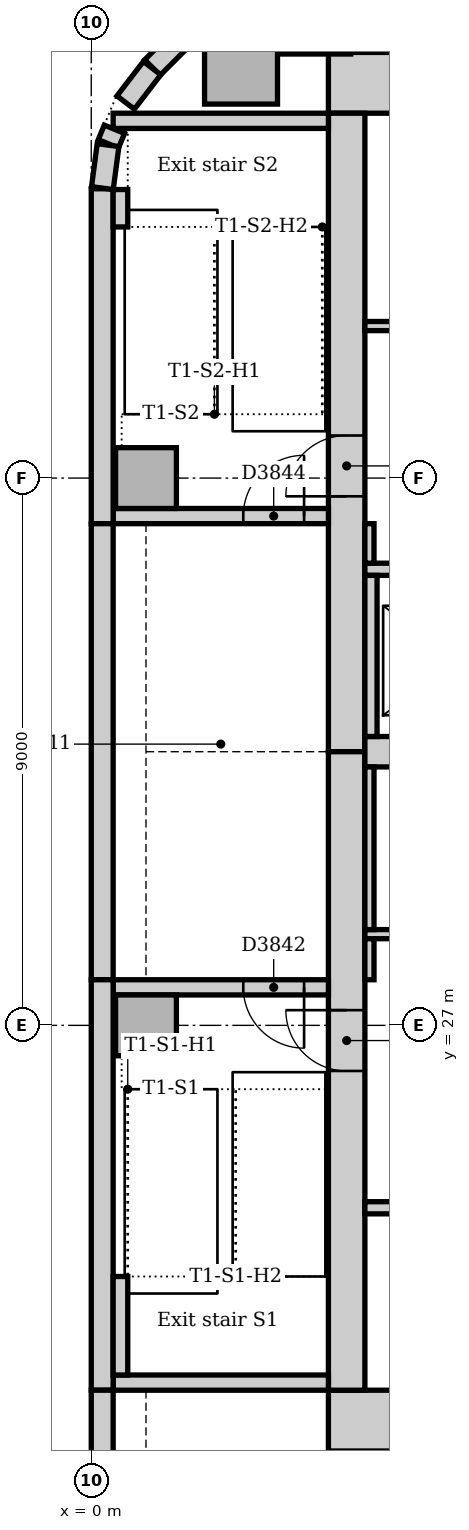
"""IFC4 building model, lengths in metres.
Left out: names, types, materials, properties, quantities, classifications, styles, units other than length and angle.
Written with IfcOpenShell. Run it as: python <this file> out.ifc"""

import sys

from ifc_helpers import new_model, si_unit, direction, frame, frame_2d, origin, origin_2d, place, context, subcontext, project, spatial, rectangle, extrude, element, fill, save


model = new_model("IFC4")
c1 = context("Model", 3, precision=1e-05, world=origin(), true_north=direction((0.0, 1.0)))
c2 = subcontext(c1, "Body", "Model", "MODEL_VIEW")
j1 = project(units=[si_unit("LENGTHUNIT", "METRE"), si_unit("PLANEANGLEUNIT", "RADIAN")], contexts=[c1])
p1 = place(None, origin())
s1 = spatial("IfcSite", under=j1, at=p1, CompositionType="ELEMENT")
p2 = place(p1, origin())
s2 = spatial("IfcBuilding", under=s1, at=p2, CompositionType="ELEMENT")
p3 = place(p2, frame((0.0, 0.0, 91.0)))
s3 = spatial("IfcBuildingStorey", under=s2, at=p3, CompositionType="ELEMENT", Elevation=91.0)
for number, where, z_axis, x_axis in (
    (1, (3.9, 20.5, 0.0), (0.0, 0.0, 1.0), (1.0, 0.0, 0.0)),
    (2, (23.5, 42.5, 0.0), (0.0, 0.0, 1.0), (-1.0, 0.0, 0.0)),
):
    element("IfcWall", number, at=place(p3, frame(where, z_axis=z_axis, x_axis=x_axis)), inside=s3, PredefinedType="SOLIDWALL", context=c2, shape_type="SweptSolid", body=[
        extrude(rectangle(XDim=19.6, YDim=1.0, at=frame_2d((9.8, 0.0))), origin(), (0.0, 0.0, 1.0), 4.0),
    ])
p4 = place(p3, frame((4.2, 42.0, 0.0), z_axis=(0.0, 0.0, 1.0), x_axis=(0.0, -1.0, 0.0)))
e3 = element("IfcWall", 3, at=p4, inside=s3, PredefinedType="SOLIDWALL", context=c2, shape_type="SweptSolid", body=[
    extrude(rectangle(XDim=10.5, YDim=0.6, at=frame_2d((5.25, 0.0))), origin(), (0.0, 0.0, 1.0), 4.0),
])
p5 = place(p4, frame((5.3, 0.0, 0.0)))
e4 = element("IfcOpeningElement", 4, at=p5, cuts=e3, PredefinedType="OPENING", context=c2, shape_type="SweptSolid", body=[
    extrude(rectangle(XDim=1.0, YDim=2.1, at=frame_2d((0.5, 1.05))), frame((0.0, 0.31, 0.0), z_axis=(0.0, -1.0, 0.0), x_axis=(1.0, 0.0, 0.0)), (0.0, 0.0, 1.0), 0.62),
])
p6 = place(p3, frame((4.2, 31.5, 0.0), z_axis=(0.0, 0.0, 1.0), x_axis=(0.0, -1.0, 0.0)))
e5 = element("IfcWall", 5, at=p6, inside=s3, PredefinedType="SOLIDWALL", context=c2, shape_type="SweptSolid", body=[
    extrude(rectangle(XDim=10.5, YDim=0.6, at=frame_2d((5.25, 0.0))), origin(), (0.0, 0.0, 1.0), 4.0),
])
p7 = place(p6, frame((4.25, 0.0, 0.0)))
e6 = element("IfcOpeningElement", 6, at=p7, cuts=e5, PredefinedType="OPENING", context=c2, shape_type="SweptSolid", body=[
    extrude(rectangle(XDim=1.0, YDim=2.1, at=frame_2d((0.5, 1.05))), frame((0.0, 0.31, 0.0), z_axis=(0.0, -1.0, 0.0), x_axis=(1.0, 0.0, 0.0)), (0.0, 0.0, 1.0), 0.62),
])
p8 = place(p3, frame((4.5, 31.5, 0.0), z_axis=(0.0, 0.0, 1.0), x_axis=(1.0, 0.0, 0.0)))
e7 = element("IfcWall", 7, at=p8, inside=s3, PredefinedType="SOLIDWALL", context=c2, shape_type="SweptSolid", body=[
    extrude(rectangle(XDim=18.0, YDim=0.5, at=frame_2d((9.0, 0.0))), origin(), (0.0, 0.0, 1.0), 4.0),
])
p9 = place(p3, frame((0.36, 21.125, 0.0), z_axis=(0.0, 0.0, 1.0), x_axis=(1.0, 0.0, 0.0)))
e8 = element("IfcWall", 8, at=p9, inside=s3, PredefinedType="SOLIDWALL", context=c2, shape_type="SweptSolid", body=[
    extrude(rectangle(XDim=3.54, YDim=0.25, at=frame_2d((1.77, 0.0))), origin(), (0.0, 0.0, 1.0), 4.0),
])
p10 = place(p3, frame((3.9, 27.625, 0.0), z_axis=(0.0, 0.0, 1.0), x_axis=(-1.0, 0.0, 0.0)))
e9 = element("IfcWall", 9, at=p10, inside=s3, PredefinedType="SOLIDWALL", context=c2, shape_type="SweptSolid", body=[
    extrude(rectangle(XDim=3.54, YDim=0.25, at=frame_2d((1.77, 0.0))), origin(), (0.0, 0.0, 1.0), 4.0),
])
p11 = place(p10, frame((0.4, 0.0, 0.0)))
e10 = element("IfcOpeningElement", 10, at=p11, cuts=e9, PredefinedType="OPENING", context=c2, shape_type="SweptSolid", body=[
    extrude(rectangle(XDim=1.0, YDim=2.1, at=frame_2d((0.5, 1.05))), frame((0.0, 0.135, 0.0), z_axis=(0.0, -1.0, 0.0), x_axis=(1.0, 0.0, 0.0)), (0.0, 0.0, 1.0), 0.27),
])
p12 = place(p3, frame((0.36, 35.375, 0.0), z_axis=(0.0, 0.0, 1.0), x_axis=(1.0, 0.0, 0.0)))
e11 = element("IfcWall", 11, at=p12, inside=s3, PredefinedType="SOLIDWALL", context=c2, shape_type="SweptSolid", body=[
    extrude(rectangle(XDim=3.54, YDim=0.25, at=frame_2d((1.77, 0.0))), origin(), (0.0, 0.0, 1.0), 4.0),
])
p13 = place(p12, frame((2.14, 0.0, 0.0)))
e12 = element("IfcOpeningElement", 12, at=p13, cuts=e11, PredefinedType="OPENING", context=c2, shape_type="SweptSolid", body=[
    extrude(rectangle(XDim=1.0, YDim=2.1, at=frame_2d((0.5, 1.05))), frame((0.0, 0.135, 0.0), z_axis=(0.0, -1.0, 0.0), x_axis=(1.0, 0.0, 0.0)), (0.0, 0.0, 1.0), 0.27),
])
p14 = place(p3, frame((3.9, 41.875, 0.0), z_axis=(0.0, 0.0, 1.0), x_axis=(-1.0, 0.0, 0.0)))
e13 = element("IfcWall", 13, at=p14, inside=s3, PredefinedType="SOLIDWALL", context=c2, shape_type="SweptSolid", body=[
    extrude(rectangle(XDim=3.54, YDim=0.25, at=frame_2d((1.77, 0.0))), origin(), (0.0, 0.0, 1.0), 4.0),
])
for number, where, z_axis, x_axis in (
    (14, (3.667, 43.574, 0.0), (0.0, 0.0, 1.0), (1.0, 0.0, 0.0)),
    (15, (2.463, 42.75, 0.0), (0.0, 0.0, 1.0), (1.0, 0.0, 0.0)),
):
    element("IfcColumn", number, at=place(p3, frame(where, z_axis=z_axis, x_axis=x_axis)), inside=s3, PredefinedType="COLUMN", context=c2, shape_type="SweptSolid", body=[
        extrude(rectangle(XDim=1.2, YDim=1.2, at=origin_2d()), origin(), (0.0, 0.0, 1.0), 3.7),
    ])
for number, where, z_axis, x_axis in (
    (16, (0.9, 27.0, 0.0), (0.0, 0.0, 1.0), (1.0, 0.0, 0.0)),
    (17, (0.9, 36.0, 0.0), (0.0, 0.0, 1.0), (1.0, 0.0, 0.0)),
):
    element("IfcColumn", number, at=place(p3, frame(where, z_axis=z_axis, x_axis=x_axis)), inside=s3, PredefinedType="COLUMN", context=c2, shape_type="SweptSolid", body=[
        extrude(rectangle(XDim=1.0, YDim=1.0, at=origin_2d()), origin(), (0.0, 0.0, 1.0), 4.0),
    ])
p15 = place(p3, frame((2.249, 43.994, 0.0), z_axis=(0.0, 0.0, 1.0), x_axis=(-0.707106781187, -0.707106781187, 0.0)))
e18 = element("IfcWall", 18, at=p15, inside=s3, PredefinedType="STANDARD", context=c2, shape_type="SweptSolid", body=[
    extrude(rectangle(XDim=1.757, YDim=0.36, at=frame_2d((0.879, 0.0))), origin(), (0.0, 0.0, 1.0), 3.7),
])
p16 = place(p3, frame((0.18, 40.757, 0.0), z_axis=(0.0, 0.0, 1.0), x_axis=(0.0, -1.0, 0.0)))
e19 = element("IfcWall", 19, at=p16, inside=s3, PredefinedType="STANDARD", context=c2, shape_type="SweptSolid", body=[
    extrude(rectangle(XDim=5.507, YDim=0.36, at=frame_2d((2.754, 0.0))), origin(), (0.0, 0.0, 1.0), 3.7),
])
p17 = place(p3, frame((0.18, 35.25, 0.0), z_axis=(0.0, 0.0, 1.0), x_axis=(0.0, -1.0, 0.0)))
e20 = element("IfcWall", 20, at=p17, inside=s3, PredefinedType="STANDARD", context=c2, shape_type="SweptSolid", body=[
    extrude(rectangle(XDim=7.5, YDim=0.36, at=frame_2d((3.75, 0.0))), origin(), (0.0, 0.0, 1.0), 3.7),
])
p18 = place(p3, frame((0.18, 27.75, 0.0), z_axis=(0.0, 0.0, 1.0), x_axis=(0.0, -1.0, 0.0)))
e21 = element("IfcWall", 21, at=p18, inside=s3, PredefinedType="STANDARD", context=c2, shape_type="SweptSolid", body=[
    extrude(rectangle(XDim=6.75, YDim=0.36, at=frame_2d((3.375, 0.0))), origin(), (0.0, 0.0, 1.0), 3.7),
])
p19 = place(p3, frame((0.18, 21.0, 0.0), z_axis=(0.0, 0.0, 1.0), x_axis=(0.0, -1.0, 0.0)))
e22 = element("IfcWall", 22, at=p19, inside=s3, PredefinedType="STANDARD", context=c2, shape_type="SweptSolid", body=[
    extrude(rectangle(XDim=16.757, YDim=0.36, at=frame_2d((8.379, 0.0))), origin(), (0.0, 0.0, 1.0), 3.7),
])
p20 = place(p19, frame((1.35, 0.0, 0.9)))
e23 = element("IfcOpeningElement", 23, at=p20, cuts=e22, PredefinedType="OPENING", context=c2, shape_type="SweptSolid", body=[
    extrude(rectangle(XDim=3.3, YDim=1.6, at=frame_2d((1.65, 0.8))), frame((0.0, 0.19, 0.0), z_axis=(0.0, -1.0, 0.0), x_axis=(1.0, 0.0, 0.0)), (0.0, 0.0, 1.0), 0.38),
])
p21 = place(p19, frame((5.85, 0.0, 0.9)))
e24 = element("IfcOpeningElement", 24, at=p21, cuts=e22, PredefinedType="OPENING", context=c2, shape_type="SweptSolid", body=[
    extrude(rectangle(XDim=3.3, YDim=1.6, at=frame_2d((1.65, 0.8))), frame((0.0, 0.19, 0.0), z_axis=(0.0, -1.0, 0.0), x_axis=(1.0, 0.0, 0.0)), (0.0, 0.0, 1.0), 0.38),
])
p22 = place(p19, frame((10.35, 0.0, 0.9)))
e25 = element("IfcOpeningElement", 25, at=p22, cuts=e22, PredefinedType="OPENING", context=c2, shape_type="SweptSolid", body=[
    extrude(rectangle(XDim=3.3, YDim=1.6, at=frame_2d((1.65, 0.8))), frame((0.0, 0.19, 0.0), z_axis=(0.0, -1.0, 0.0), x_axis=(1.0, 0.0, 0.0)), (0.0, 0.0, 1.0), 0.38),
])
p23 = place(p3, frame((1.0, 42.741, 0.0), z_axis=(0.0, 0.0, 1.0), x_axis=(-0.608802368033, -0.793321924995, 0.0)))
e26 = element("IfcWall", 26, at=p23, inside=s3, PredefinedType="STANDARD", context=c2, shape_type="SweptSolid", body=[
    extrude(rectangle(XDim=0.713, YDim=0.36, at=frame_2d((0.357, 0.0))), origin(), (0.0, 0.0, 1.0), 3.7),
])
p24 = place(p3, frame((0.381, 41.736, 0.0), z_axis=(0.0, 0.0, 1.0), x_axis=(-0.382773360986, -0.923842277729, 0.0)))
e27 = element("IfcWall", 27, at=p24, inside=s3, PredefinedType="STANDARD", context=c2, shape_type="SweptSolid", body=[
    extrude(rectangle(XDim=0.258, YDim=0.36, at=frame_2d((0.129, 0.0))), origin(), (0.0, 0.0, 1.0), 3.7),
])
p25 = place(p3, frame((0.276, 41.476, 0.0), z_axis=(0.0, 0.0, 1.0), x_axis=(-0.13055608231, -0.99144092581, 0.0)))
e28 = element("IfcWall", 28, at=p25, inside=s3, PredefinedType="STANDARD", context=c2, shape_type="SweptSolid", body=[
    extrude(rectangle(XDim=0.713, YDim=0.36, at=frame_2d((0.356, 0.0))), origin(), (0.0, 0.0, 1.0), 3.7),
])
p26 = place(p3, frame((0.48, 21.25, 0.0), z_axis=(0.0, 0.0, 1.0), x_axis=(0.0, 1.0, 0.0)))
e29 = element("IfcWall", 29, at=p26, inside=s3, PredefinedType="STANDARD", context=c2, shape_type="SweptSolid", body=[
    extrude(rectangle(XDim=1.62, YDim=0.24, at=frame_2d((0.81, 0.0))), origin(), (0.0, 0.0, 1.0), 4.0),
])
p27 = place(p3, frame((0.48, 40.13, 0.0), z_axis=(0.0, 0.0, 1.0), x_axis=(0.0, 1.0, 0.0)))
e30 = element("IfcWall", 30, at=p27, inside=s3, PredefinedType="STANDARD", context=c2, shape_type="SweptSolid", body=[
    extrude(rectangle(XDim=0.615, YDim=0.24, at=frame_2d((0.307, 0.0))), origin(), (0.0, 0.0, 1.0), 4.0),
])
p28 = place(p3, frame((4.5, 24.0, 0.0), z_axis=(0.0, 0.0, 1.0), x_axis=(1.0, 0.0, 0.0)))
e31 = element("IfcWall", 31, at=p28, inside=s3, PredefinedType="PARTITIONING", context=c2, shape_type="SweptSolid", body=[
    extrude(rectangle(XDim=18.0, YDim=0.2, at=frame_2d((9.0, 0.0))), origin(), (0.0, 0.0, 1.0), 3.7),
])
p29 = place(p28, frame((0.95, 0.0, 0.0)))
e32 = element("IfcOpeningElement", 32, at=p29, cuts=e31, PredefinedType="OPENING", context=c2, shape_type="SweptSolid", body=[
    extrude(rectangle(XDim=1.1, YDim=2.1, at=frame_2d((0.55, 1.05))), frame((0.0, 0.11, 0.0), z_axis=(0.0, -1.0, 0.0), x_axis=(1.0, 0.0, 0.0)), (0.0, 0.0, 1.0), 0.22),
])
p30 = place(p28, frame((3.95, 0.0, 0.0)))
e33 = element("IfcOpeningElement", 33, at=p30, cuts=e31, PredefinedType="OPENING", context=c2, shape_type="SweptSolid", body=[
    extrude(rectangle(XDim=1.1, YDim=2.1, at=frame_2d((0.55, 1.05))), frame((0.0, 0.11, 0.0), z_axis=(0.0, -1.0, 0.0), x_axis=(1.0, 0.0, 0.0)), (0.0, 0.0, 1.0), 0.22),
])
p31 = place(p28, frame((6.95, 0.0, 0.0)))
e34 = element("IfcOpeningElement", 34, at=p31, cuts=e31, PredefinedType="OPENING", context=c2, shape_type="SweptSolid", body=[
    extrude(rectangle(XDim=1.1, YDim=2.1, at=frame_2d((0.55, 1.05))), frame((0.0, 0.11, 0.0), z_axis=(0.0, -1.0, 0.0), x_axis=(1.0, 0.0, 0.0)), (0.0, 0.0, 1.0), 0.22),
])
p32 = place(p28, frame((9.95, 0.0, 0.0)))
e35 = element("IfcOpeningElement", 35, at=p32, cuts=e31, PredefinedType="OPENING", context=c2, shape_type="SweptSolid", body=[
    extrude(rectangle(XDim=1.1, YDim=2.1, at=frame_2d((0.55, 1.05))), frame((0.0, 0.11, 0.0), z_axis=(0.0, -1.0, 0.0), x_axis=(1.0, 0.0, 0.0)), (0.0, 0.0, 1.0), 0.22),
])
p33 = place(p28, frame((12.95, 0.0, 0.0)))
e36 = element("IfcOpeningElement", 36, at=p33, cuts=e31, PredefinedType="OPENING", context=c2, shape_type="SweptSolid", body=[
    extrude(rectangle(XDim=1.1, YDim=2.1, at=frame_2d((0.55, 1.05))), frame((0.0, 0.11, 0.0), z_axis=(0.0, -1.0, 0.0), x_axis=(1.0, 0.0, 0.0)), (0.0, 0.0, 1.0), 0.22),
])
p34 = place(p28, frame((15.95, 0.0, 0.0)))
e37 = element("IfcOpeningElement", 37, at=p34, cuts=e31, PredefinedType="OPENING", context=c2, shape_type="SweptSolid", body=[
    extrude(rectangle(XDim=1.1, YDim=2.1, at=frame_2d((0.55, 1.05))), frame((0.0, 0.11, 0.0), z_axis=(0.0, -1.0, 0.0), x_axis=(1.0, 0.0, 0.0)), (0.0, 0.0, 1.0), 0.22),
])
p35 = place(p3, frame((4.5, 34.5, 0.0), z_axis=(0.0, 0.0, 1.0), x_axis=(1.0, 0.0, 0.0)))
e38 = element("IfcWall", 38, at=p35, inside=s3, PredefinedType="PARTITIONING", context=c2, shape_type="SweptSolid", body=[
    extrude(rectangle(XDim=18.0, YDim=0.2, at=frame_2d((9.0, 0.0))), origin(), (0.0, 0.0, 1.0), 3.7),
])
p36 = place(p35, frame((0.95, 0.0, 0.0)))
e39 = element("IfcOpeningElement", 39, at=p36, cuts=e38, PredefinedType="OPENING", context=c2, shape_type="SweptSolid", body=[
    extrude(rectangle(XDim=1.1, YDim=2.1, at=frame_2d((0.55, 1.05))), frame((0.0, 0.11, 0.0), z_axis=(0.0, -1.0, 0.0), x_axis=(1.0, 0.0, 0.0)), (0.0, 0.0, 1.0), 0.22),
])
p37 = place(p35, frame((3.95, 0.0, 0.0)))
e40 = element("IfcOpeningElement", 40, at=p37, cuts=e38, PredefinedType="OPENING", context=c2, shape_type="SweptSolid", body=[
    extrude(rectangle(XDim=1.1, YDim=2.1, at=frame_2d((0.55, 1.05))), frame((0.0, 0.11, 0.0), z_axis=(0.0, -1.0, 0.0), x_axis=(1.0, 0.0, 0.0)), (0.0, 0.0, 1.0), 0.22),
])
p38 = place(p35, frame((12.95, 0.0, 0.0)))
e41 = element("IfcOpeningElement", 41, at=p38, cuts=e38, PredefinedType="OPENING", context=c2, shape_type="SweptSolid", body=[
    extrude(rectangle(XDim=1.1, YDim=2.1, at=frame_2d((0.55, 1.05))), frame((0.0, 0.11, 0.0), z_axis=(0.0, -1.0, 0.0), x_axis=(1.0, 0.0, 0.0)), (0.0, 0.0, 1.0), 0.22),
])
p39 = place(p35, frame((15.95, 0.0, 0.0)))
e42 = element("IfcOpeningElement", 42, at=p39, cuts=e38, PredefinedType="OPENING", context=c2, shape_type="SweptSolid", body=[
    extrude(rectangle(XDim=1.1, YDim=2.1, at=frame_2d((0.55, 1.05))), frame((0.0, 0.11, 0.0), z_axis=(0.0, -1.0, 0.0), x_axis=(1.0, 0.0, 0.0)), (0.0, 0.0, 1.0), 0.22),
])
p40 = place(p3, frame((4.6, 31.75, 0.0), z_axis=(0.0, 0.0, 1.0), x_axis=(0.0, 1.0, 0.0)))
e43 = element("IfcWall", 43, at=p40, inside=s3, PredefinedType="PARTITIONING", context=c2, shape_type="SweptSolid", body=[
    extrude(rectangle(XDim=2.65, YDim=0.2, at=frame_2d((1.325, 0.0))), origin(), (0.0, 0.0, 1.0), 3.7),
])
p41 = place(p3, frame((4.5, 28.5, 0.0), z_axis=(0.0, 0.0, 1.0), x_axis=(1.0, 0.0, 0.0)))
e44 = element("IfcWall", 44, at=p41, inside=s3, PredefinedType="PARTITIONING", context=c2, shape_type="SweptSolid", body=[
    extrude(rectangle(XDim=18.0, YDim=0.15, at=frame_2d((9.0, 0.0))), origin(), (0.0, 0.0, 1.0), 3.7),
])
p42 = place(p41, frame((1.85, 0.0, 0.0)))
e45 = element("IfcOpeningElement", 45, at=p42, cuts=e44, PredefinedType="OPENING", context=c2, shape_type="SweptSolid", body=[
    extrude(rectangle(XDim=0.9, YDim=2.1, at=frame_2d((0.45, 1.05))), frame((0.0, 0.085, 0.0), z_axis=(0.0, -1.0, 0.0), x_axis=(1.0, 0.0, 0.0)), (0.0, 0.0, 1.0), 0.17),
])
p43 = place(p41, frame((8.55, 0.0, 0.0)))
e46 = element("IfcOpeningElement", 46, at=p43, cuts=e44, PredefinedType="OPENING", context=c2, shape_type="SweptSolid", body=[
    extrude(rectangle(XDim=0.9, YDim=2.1, at=frame_2d((0.45, 1.05))), frame((0.0, 0.085, 0.0), z_axis=(0.0, -1.0, 0.0), x_axis=(1.0, 0.0, 0.0)), (0.0, 0.0, 1.0), 0.17),
])
p44 = place(p41, frame((15.2, 0.0, 0.0)))
e47 = element("IfcOpeningElement", 47, at=p44, cuts=e44, PredefinedType="OPENING", context=c2, shape_type="SweptSolid", body=[
    extrude(rectangle(XDim=0.9, YDim=2.1, at=frame_2d((0.45, 1.05))), frame((0.0, 0.085, 0.0), z_axis=(0.0, -1.0, 0.0), x_axis=(1.0, 0.0, 0.0)), (0.0, 0.0, 1.0), 0.17),
])
p45 = place(p3, frame((4.5, 38.5, 0.0), z_axis=(0.0, 0.0, 1.0), x_axis=(1.0, 0.0, 0.0)))
e48 = element("IfcWall", 48, at=p45, inside=s3, PredefinedType="PARTITIONING", context=c2, shape_type="SweptSolid", body=[
    extrude(rectangle(XDim=11.9, YDim=0.15, at=frame_2d((5.95, 0.0))), origin(), (0.0, 0.0, 1.0), 3.7),
])
p46 = place(p45, frame((1.1, 0.0, 0.0)))
e49 = element("IfcOpeningElement", 49, at=p46, cuts=e48, PredefinedType="OPENING", context=c2, shape_type="SweptSolid", body=[
    extrude(rectangle(XDim=0.9, YDim=2.1, at=frame_2d((0.45, 1.05))), frame((0.0, 0.085, 0.0), z_axis=(0.0, -1.0, 0.0), x_axis=(1.0, 0.0, 0.0)), (0.0, 0.0, 1.0), 0.17),
])
p47 = place(p45, frame((4.05, 0.0, 0.0)))
e50 = element("IfcOpeningElement", 50, at=p47, cuts=e48, PredefinedType="OPENING", context=c2, shape_type="SweptSolid", body=[
    extrude(rectangle(XDim=0.9, YDim=2.1, at=frame_2d((0.45, 1.05))), frame((0.0, 0.085, 0.0), z_axis=(0.0, -1.0, 0.0), x_axis=(1.0, 0.0, 0.0)), (0.0, 0.0, 1.0), 0.17),
])
p48 = place(p45, frame((7.05, 0.0, 0.0)))
e51 = element("IfcOpeningElement", 51, at=p48, cuts=e48, PredefinedType="OPENING", context=c2, shape_type="SweptSolid", body=[
    extrude(rectangle(XDim=0.9, YDim=2.1, at=frame_2d((0.45, 1.05))), frame((0.0, 0.085, 0.0), z_axis=(0.0, -1.0, 0.0), x_axis=(1.0, 0.0, 0.0)), (0.0, 0.0, 1.0), 0.17),
])
p49 = place(p45, frame((9.95, 0.0, 0.0)))
e52 = element("IfcOpeningElement", 52, at=p49, cuts=e48, PredefinedType="OPENING", context=c2, shape_type="SweptSolid", body=[
    extrude(rectangle(XDim=0.8, YDim=2.1, at=frame_2d((0.4, 1.05))), frame((0.0, 0.085, 0.0), z_axis=(0.0, -1.0, 0.0), x_axis=(1.0, 0.0, 0.0)), (0.0, 0.0, 1.0), 0.17),
])
p50 = place(p3, frame((4.575, 27.75, 0.0), z_axis=(0.0, 0.0, 1.0), x_axis=(0.0, 1.0, 0.0)))
e53 = element("IfcWall", 53, at=p50, inside=s3, PredefinedType="PARTITIONING", context=c2, shape_type="SweptSolid", body=[
    extrude(rectangle(XDim=0.675, YDim=0.15, at=frame_2d((0.338, 0.0))), origin(), (0.0, 0.0, 1.0), 3.7),
])
p51 = place(p3, frame((4.575, 28.575, 0.0), z_axis=(0.0, 0.0, 1.0), x_axis=(0.0, 1.0, 0.0)))
e54 = element("IfcWall", 54, at=p51, inside=s3, PredefinedType="PARTITIONING", context=c2, shape_type="SweptSolid", body=[
    extrude(rectangle(XDim=2.675, YDim=0.15, at=frame_2d((1.337, 0.0))), origin(), (0.0, 0.0, 1.0), 3.7),
])
p52 = place(p3, frame((4.575, 34.6, 0.0), z_axis=(0.0, 0.0, 1.0), x_axis=(0.0, 1.0, 0.0)))
e55 = element("IfcWall", 55, at=p52, inside=s3, PredefinedType="PARTITIONING", context=c2, shape_type="SweptSolid", body=[
    extrude(rectangle(XDim=0.65, YDim=0.15, at=frame_2d((0.325, 0.0))), origin(), (0.0, 0.0, 1.0), 3.7),
])
p53 = place(p7, frame((1.0, 0.0, 0.0), z_axis=(0.0, 0.0, 1.0), x_axis=(-1.0, 0.0, 0.0)))
e56 = element("IfcDoor", 56, at=p53, inside=s3, OperationType="SINGLE_SWING_RIGHT", PredefinedType="DOOR", context=c2, shape_type="SweptSolid", body=[
    extrude(rectangle(XDim=1.0, YDim=2.1, at=frame_2d((0.5, 1.05))), frame((0.0, 0.025, 0.0), z_axis=(0.0, -1.0, 0.0), x_axis=(1.0, 0.0, 0.0)), (0.0, 0.0, 1.0), 0.05),
])
fill(e6, e56)
p54 = place(p11, origin())
e57 = element("IfcDoor", 57, at=p54, inside=s3, OperationType="SINGLE_SWING_LEFT", PredefinedType="DOOR", context=c2, shape_type="SweptSolid", body=[
    extrude(rectangle(XDim=1.0, YDim=2.1, at=frame_2d((0.5, 1.05))), frame((0.0, 0.025, 0.0), z_axis=(0.0, -1.0, 0.0), x_axis=(1.0, 0.0, 0.0)), (0.0, 0.0, 1.0), 0.05),
])
fill(e10, e57)
p55 = place(p5, frame((1.0, 0.0, 0.0), z_axis=(0.0, 0.0, 1.0), x_axis=(-1.0, 0.0, 0.0)))
e58 = element("IfcDoor", 58, at=p55, inside=s3, OperationType="SINGLE_SWING_LEFT", PredefinedType="DOOR", context=c2, shape_type="SweptSolid", body=[
    extrude(rectangle(XDim=1.0, YDim=2.1, at=frame_2d((0.5, 1.05))), frame((0.0, 0.025, 0.0), z_axis=(0.0, -1.0, 0.0), x_axis=(1.0, 0.0, 0.0)), (0.0, 0.0, 1.0), 0.05),
])
fill(e4, e58)
p56 = place(p13, origin())
e59 = element("IfcDoor", 59, at=p56, inside=s3, OperationType="SINGLE_SWING_RIGHT", PredefinedType="DOOR", context=c2, shape_type="SweptSolid", body=[
    extrude(rectangle(XDim=1.0, YDim=2.1, at=frame_2d((0.5, 1.05))), frame((0.0, 0.025, 0.0), z_axis=(0.0, -1.0, 0.0), x_axis=(1.0, 0.0, 0.0)), (0.0, 0.0, 1.0), 0.05),
])
fill(e12, e59)
save(model, sys.argv[1])
